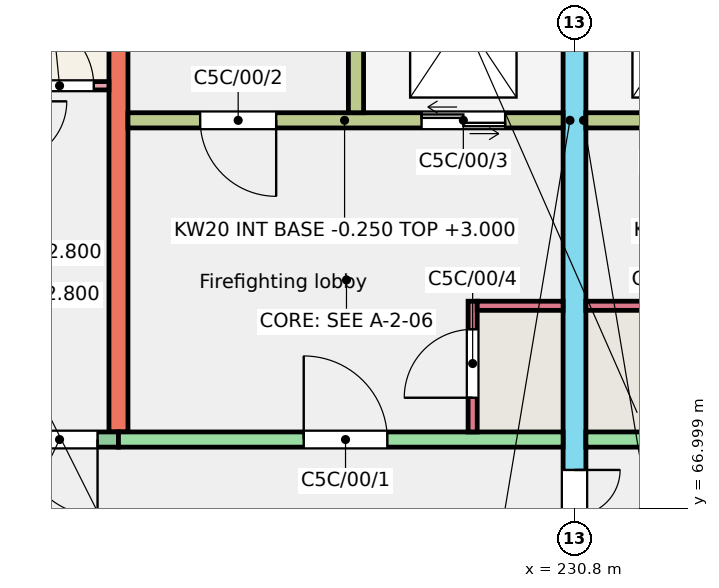
"""IFC4 building model, lengths in metres.
Left out: names, types, materials, properties, quantities, classifications, styles, units other than length and angle.
Written with IfcOpenShell. Run it as: python <this file> out.ifc"""

import sys

from ifc_helpers import new_model, si_unit, direction, frame, frame_2d, origin, place, context, subcontext, project, spatial, rectangle, extrude, element, fill, save


model = new_model("IFC4")
c1 = context("Model", 3, precision=1e-05, world=origin(), true_north=direction((0.0, 1.0)))
c2 = subcontext(c1, "Body", "Model", "MODEL_VIEW")
j1 = project(units=[si_unit("LENGTHUNIT", "METRE"), si_unit("PLANEANGLEUNIT", "RADIAN")], contexts=[c1])
p1 = place(None, origin())
s1 = spatial("IfcSite", under=j1, at=p1, CompositionType="ELEMENT")
p2 = place(p1, origin())
s2 = spatial("IfcBuilding", under=s1, at=p2, CompositionType="ELEMENT")
p3 = place(p2, origin())
s3 = spatial("IfcBuildingStorey", under=s2, at=p3, CompositionType="ELEMENT", Elevation=0.0)
p4 = place(p3, frame((224.8, 68.0, -0.25), z_axis=(0.0, 0.0, 1.0), x_axis=(0.0, 1.0, 0.0)))
e1 = element("IfcWall", 1, at=p4, inside=s3, PredefinedType="SHEAR", context=c2, shape_type="SweptSolid", body=[
    extrude(rectangle(XDim=9.0, YDim=0.25, at=frame_2d((4.5, 0.0))), origin(), (0.0, 0.0, 1.0), 3.25),
])
p5 = place(p3, frame((230.8, 66.0, -0.25), z_axis=(0.0, 0.0, 1.0), x_axis=(0.0, 1.0, 0.0)))
e2 = element("IfcWall", 2, at=p5, inside=s3, PredefinedType="SHEAR", context=c2, shape_type="SweptSolid", body=[
    extrude(rectangle(XDim=11.0, YDim=0.3, at=frame_2d((5.5, 0.0))), origin(), (0.0, 0.0, 1.0), 3.25),
])
p6 = place(p5, frame((0.3, 0.0, 0.25)))
e3 = element("IfcOpeningElement", 3, at=p6, cuts=e2, PredefinedType="OPENING", context=c2, shape_type="SweptSolid", body=[
    extrude(rectangle(XDim=1.2, YDim=2.1, at=frame_2d((0.6, 1.05))), frame((0.0, 0.16, 0.0), z_axis=(0.0, -1.0, 0.0), x_axis=(1.0, 0.0, 0.0)), (0.0, 0.0, 1.0), 0.32),
])
p7 = place(p3, frame((221.2, 67.9, -0.25), z_axis=(0.0, 0.0, 1.0), x_axis=(1.0, 0.0, 0.0)))
e4 = element("IfcWall", 4, at=p7, inside=s3, PredefinedType="SOLIDWALL", context=c2, shape_type="SweptSolid", body=[
    extrude(rectangle(XDim=3.6, YDim=0.2, at=frame_2d((1.8, 0.0))), origin(), (0.0, 0.0, 1.0), 3.25),
])
p8 = place(p7, frame((0.495, 0.0, 1.35)))
e5 = element("IfcOpeningElement", 5, at=p8, cuts=e4, PredefinedType="OPENING", context=c2, shape_type="SweptSolid", body=[
    extrude(rectangle(XDim=1.2, YDim=1.3, at=frame_2d((0.6, 0.65))), frame((0.0, 0.11, 0.0), z_axis=(0.0, -1.0, 0.0), x_axis=(1.0, 0.0, 0.0)), (0.0, 0.0, 1.0), 0.22),
])
p9 = place(p7, frame((2.325, 0.0, 0.25)))
e6 = element("IfcOpeningElement", 6, at=p9, cuts=e4, PredefinedType="OPENING", context=c2, shape_type="SweptSolid", body=[
    extrude(rectangle(XDim=1.0, YDim=2.1, at=frame_2d((0.5, 1.05))), frame((0.0, 0.11, 0.0), z_axis=(0.0, -1.0, 0.0), x_axis=(1.0, 0.0, 0.0)), (0.0, 0.0, 1.0), 0.22),
])
p10 = place(p3, frame((224.8, 67.9, -0.25), z_axis=(0.0, 0.0, 1.0), x_axis=(1.0, 0.0, 0.0)))
e7 = element("IfcWall", 7, at=p10, inside=s3, PredefinedType="SHEAR", context=c2, shape_type="SweptSolid", body=[
    extrude(rectangle(XDim=5.85, YDim=0.2, at=frame_2d((2.925, 0.0))), origin(), (0.0, 0.0, 1.0), 3.25),
])
p11 = place(p10, frame((2.438, 0.0, 0.25)))
e8 = element("IfcOpeningElement", 8, at=p11, cuts=e7, PredefinedType="OPENING", context=c2, shape_type="SweptSolid", body=[
    extrude(rectangle(XDim=1.1, YDim=2.1, at=frame_2d((0.55, 1.05))), frame((0.0, 0.11, 0.0), z_axis=(0.0, -1.0, 0.0), x_axis=(1.0, 0.0, 0.0)), (0.0, 0.0, 1.0), 0.22),
])
p12 = place(p3, frame((224.925, 72.1, -0.25), z_axis=(0.0, 0.0, 1.0), x_axis=(1.0, 0.0, 0.0)))
e9 = element("IfcWall", 9, at=p12, inside=s3, PredefinedType="SHEAR", context=c2, shape_type="SweptSolid", body=[
    extrude(rectangle(XDim=5.725, YDim=0.2, at=frame_2d((2.862, 0.0))), origin(), (0.0, 0.0, 1.0), 3.25),
])
p13 = place(p12, frame((0.95, 0.0, 0.25)))
e10 = element("IfcOpeningElement", 10, at=p13, cuts=e9, PredefinedType="OPENING", context=c2, shape_type="SweptSolid", body=[
    extrude(rectangle(XDim=1.0, YDim=2.1, at=frame_2d((0.5, 1.05))), frame((0.0, 0.11, 0.0), z_axis=(0.0, -1.0, 0.0), x_axis=(1.0, 0.0, 0.0)), (0.0, 0.0, 1.0), 0.22),
])
p14 = place(p12, frame((3.863, 0.0, 0.25)))
e11 = element("IfcOpeningElement", 11, at=p14, cuts=e9, PredefinedType="OPENING", context=c2, shape_type="SweptSolid", body=[
    extrude(rectangle(XDim=1.1, YDim=2.1, at=frame_2d((0.55, 1.05))), frame((0.0, 0.11, 0.0), z_axis=(0.0, -1.0, 0.0), x_axis=(1.0, 0.0, 0.0)), (0.0, 0.0, 1.0), 0.22),
])
p15 = place(p3, frame((227.925, 72.2, -0.25), z_axis=(0.0, 0.0, 1.0), x_axis=(0.0, 1.0, 0.0)))
e12 = element("IfcWall", 12, at=p15, inside=s3, PredefinedType="SHEAR", context=c2, shape_type="SweptSolid", body=[
    extrude(rectangle(XDim=4.8, YDim=0.2, at=frame_2d((2.4, 0.0))), origin(), (0.0, 0.0, 1.0), 3.25),
])
p16 = place(p3, frame((229.46, 68.0, -0.25), z_axis=(0.0, 0.0, 1.0), x_axis=(0.0, 1.0, 0.0)))
e13 = element("IfcWall", 13, at=p16, inside=s3, PredefinedType="SHEAR", context=c2, shape_type="SweptSolid", body=[
    extrude(rectangle(XDim=1.72, YDim=0.12, at=frame_2d((0.86, 0.0))), origin(), (0.0, 0.0, 1.0), 3.25),
])
p17 = place(p16, frame((0.45, 0.0, 0.25)))
e14 = element("IfcOpeningElement", 14, at=p17, cuts=e13, PredefinedType="OPENING", context=c2, shape_type="SweptSolid", body=[
    extrude(rectangle(XDim=0.9, YDim=2.1, at=frame_2d((0.45, 1.05))), frame((0.0, 0.07, 0.0), z_axis=(0.0, -1.0, 0.0), x_axis=(1.0, 0.0, 0.0)), (0.0, 0.0, 1.0), 0.14),
])
p18 = place(p3, frame((229.52, 69.66, -0.25), z_axis=(0.0, 0.0, 1.0), x_axis=(1.0, 0.0, 0.0)))
e15 = element("IfcWall", 15, at=p18, inside=s3, PredefinedType="SHEAR", context=c2, shape_type="SweptSolid", body=[
    extrude(rectangle(XDim=1.13, YDim=0.12, at=frame_2d((0.565, 0.0))), origin(), (0.0, 0.0, 1.0), 3.25),
])
p19 = place(p3, frame((230.95, 67.9, -0.25), z_axis=(0.0, 0.0, 1.0), x_axis=(1.0, 0.0, 0.0)))
e16 = element("IfcWall", 16, at=p19, inside=s3, PredefinedType="SHEAR", context=c2, shape_type="SweptSolid", body=[
    extrude(rectangle(XDim=5.85, YDim=0.2, at=frame_2d((2.925, 0.0))), origin(), (0.0, 0.0, 1.0), 3.25),
])
p20 = place(p19, frame((2.312, 0.0, 0.25)))
e17 = element("IfcOpeningElement", 17, at=p20, cuts=e16, PredefinedType="OPENING", context=c2, shape_type="SweptSolid", body=[
    extrude(rectangle(XDim=1.1, YDim=2.1, at=frame_2d((0.55, 1.05))), frame((0.0, 0.11, 0.0), z_axis=(0.0, -1.0, 0.0), x_axis=(1.0, 0.0, 0.0)), (0.0, 0.0, 1.0), 0.22),
])
p21 = place(p3, frame((230.95, 72.1, -0.25), z_axis=(0.0, 0.0, 1.0), x_axis=(1.0, 0.0, 0.0)))
e18 = element("IfcWall", 18, at=p21, inside=s3, PredefinedType="SHEAR", context=c2, shape_type="SweptSolid", body=[
    extrude(rectangle(XDim=5.725, YDim=0.2, at=frame_2d((2.863, 0.0))), origin(), (0.0, 0.0, 1.0), 3.25),
])
p22 = place(p21, frame((3.775, 0.0, 0.25)))
e19 = element("IfcOpeningElement", 19, at=p22, cuts=e18, PredefinedType="OPENING", context=c2, shape_type="SweptSolid", body=[
    extrude(rectangle(XDim=1.0, YDim=2.1, at=frame_2d((0.5, 1.05))), frame((0.0, 0.11, 0.0), z_axis=(0.0, -1.0, 0.0), x_axis=(1.0, 0.0, 0.0)), (0.0, 0.0, 1.0), 0.22),
])
p23 = place(p21, frame((0.762, 0.0, 0.25)))
e20 = element("IfcOpeningElement", 20, at=p23, cuts=e18, PredefinedType="OPENING", context=c2, shape_type="SweptSolid", body=[
    extrude(rectangle(XDim=1.1, YDim=2.1, at=frame_2d((0.55, 1.05))), frame((0.0, 0.11, 0.0), z_axis=(0.0, -1.0, 0.0), x_axis=(1.0, 0.0, 0.0)), (0.0, 0.0, 1.0), 0.22),
])
p24 = place(p3, frame((230.95, 69.66, -0.25), z_axis=(0.0, 0.0, 1.0), x_axis=(1.0, 0.0, 0.0)))
e21 = element("IfcWall", 21, at=p24, inside=s3, PredefinedType="SHEAR", context=c2, shape_type="SweptSolid", body=[
    extrude(rectangle(XDim=1.13, YDim=0.12, at=frame_2d((0.565, 0.0))), origin(), (0.0, 0.0, 1.0), 3.25),
])
p25 = place(p3, frame((227.825, 72.1, -1.4), z_axis=(0.0, 0.0, 1.0), x_axis=(1.0, 0.0, 0.0)))
e22 = element("IfcWall", 22, at=p25, inside=s3, PredefinedType="SHEAR", context=c2, shape_type="SweptSolid", body=[
    extrude(rectangle(XDim=2.975, YDim=0.2, at=frame_2d((1.488, 0.0))), origin(), (0.0, 0.0, 1.0), 1.15),
])
p26 = place(p3, frame((227.925, 72.2, -1.4), z_axis=(0.0, 0.0, 1.0), x_axis=(0.0, 1.0, 0.0)))
e23 = element("IfcWall", 23, at=p26, inside=s3, PredefinedType="SHEAR", context=c2, shape_type="SweptSolid", body=[
    extrude(rectangle(XDim=3.0, YDim=0.2, at=frame_2d((1.5, 0.0))), origin(), (0.0, 0.0, 1.0), 1.15),
])
p27 = place(p3, frame((230.725, 72.2, -1.4), z_axis=(0.0, 0.0, 1.0), x_axis=(0.0, 1.0, 0.0)))
e24 = element("IfcWall", 24, at=p27, inside=s3, PredefinedType="SHEAR", context=c2, shape_type="SweptSolid", body=[
    extrude(rectangle(XDim=3.0, YDim=0.15, at=frame_2d((1.5, 0.0))), origin(), (0.0, 0.0, 1.0), 1.15),
])
p28 = place(p3, frame((230.8, 72.1, -1.4), z_axis=(0.0, 0.0, 1.0), x_axis=(1.0, 0.0, 0.0)))
e25 = element("IfcWall", 25, at=p28, inside=s3, PredefinedType="SHEAR", context=c2, shape_type="SweptSolid", body=[
    extrude(rectangle(XDim=2.975, YDim=0.2, at=frame_2d((1.487, 0.0))), origin(), (0.0, 0.0, 1.0), 1.15),
])
p29 = place(p3, frame((230.875, 72.2, -1.4), z_axis=(0.0, 0.0, 1.0), x_axis=(0.0, 1.0, 0.0)))
e26 = element("IfcWall", 26, at=p29, inside=s3, PredefinedType="SHEAR", context=c2, shape_type="SweptSolid", body=[
    extrude(rectangle(XDim=3.0, YDim=0.15, at=frame_2d((1.5, 0.0))), origin(), (0.0, 0.0, 1.0), 1.15),
])
p30 = place(p3, frame((221.325, 72.555, 0.0), z_axis=(0.0, 0.0, 1.0), x_axis=(1.0, 0.0, 0.0)))
e27 = element("IfcWall", 27, at=p30, inside=s3, PredefinedType="PARTITIONING", context=c2, shape_type="SweptSolid", body=[
    extrude(rectangle(XDim=3.35, YDim=0.11, at=frame_2d((1.675, 0.0))), origin(), (0.0, 0.0, 1.0), 2.8),
])
p31 = place(p30, frame((2.25, 0.0, 0.0)))
e28 = element("IfcOpeningElement", 28, at=p31, cuts=e27, PredefinedType="OPENING", context=c2, shape_type="SweptSolid", body=[
    extrude(rectangle(XDim=0.9, YDim=2.1, at=frame_2d((0.45, 1.05))), frame((0.0, 0.065, 0.0), z_axis=(0.0, -1.0, 0.0), x_axis=(1.0, 0.0, 0.0)), (0.0, 0.0, 1.0), 0.13),
])
p32 = place(p9, origin())
e29 = element("IfcDoor", 29, at=p32, inside=s3, OperationType="SINGLE_SWING_RIGHT", PredefinedType="DOOR", context=c2, shape_type="SweptSolid", body=[
    extrude(rectangle(XDim=1.0, YDim=2.1, at=frame_2d((0.5, 1.05))), frame((0.0, 0.025, 0.0), z_axis=(0.0, -1.0, 0.0), x_axis=(1.0, 0.0, 0.0)), (0.0, 0.0, 1.0), 0.05),
])
fill(e6, e29)
p33 = place(p31, origin())
e30 = element("IfcDoor", 30, at=p33, inside=s3, OperationType="SINGLE_SWING_LEFT", PredefinedType="DOOR", context=c2, shape_type="SweptSolid", body=[
    extrude(rectangle(XDim=0.9, YDim=2.1, at=frame_2d((0.45, 1.05))), frame((0.0, 0.025, 0.0), z_axis=(0.0, -1.0, 0.0), x_axis=(1.0, 0.0, 0.0)), (0.0, 0.0, 1.0), 0.05),
])
fill(e28, e30)
p34 = place(p11, origin())
e31 = element("IfcDoor", 31, at=p34, inside=s3, OperationType="SINGLE_SWING_LEFT", PredefinedType="DOOR", context=c2, shape_type="SweptSolid", body=[
    extrude(rectangle(XDim=1.1, YDim=2.1, at=frame_2d((0.55, 1.05))), frame((0.0, 0.025, 0.0), z_axis=(0.0, -1.0, 0.0), x_axis=(1.0, 0.0, 0.0)), (0.0, 0.0, 1.0), 0.05),
])
fill(e8, e31)
p35 = place(p13, origin())
e32 = element("IfcDoor", 32, at=p35, inside=s3, OperationType="SINGLE_SWING_RIGHT", PredefinedType="DOOR", context=c2, shape_type="SweptSolid", body=[
    extrude(rectangle(XDim=1.0, YDim=2.1, at=frame_2d((0.5, 1.05))), frame((0.0, 0.025, 0.0), z_axis=(0.0, -1.0, 0.0), x_axis=(1.0, 0.0, 0.0)), (0.0, 0.0, 1.0), 0.05),
])
fill(e10, e32)
p36 = place(p14, origin())
e33 = element("IfcDoor", 33, at=p36, inside=s3, OperationType="DOUBLE_DOOR_SLIDING", PredefinedType="DOOR", context=c2, shape_type="SweptSolid", body=[
    extrude(rectangle(XDim=1.1, YDim=2.1, at=frame_2d((0.55, 1.05))), frame((0.0, 0.025, 0.0), z_axis=(0.0, -1.0, 0.0), x_axis=(1.0, 0.0, 0.0)), (0.0, 0.0, 1.0), 0.05),
])
fill(e11, e33)
p37 = place(p17, origin())
e34 = element("IfcDoor", 34, at=p37, inside=s3, OperationType="SINGLE_SWING_LEFT", PredefinedType="DOOR", context=c2, shape_type="SweptSolid", body=[
    extrude(rectangle(XDim=0.9, YDim=2.1, at=frame_2d((0.45, 1.05))), frame((0.0, 0.025, 0.0), z_axis=(0.0, -1.0, 0.0), x_axis=(1.0, 0.0, 0.0)), (0.0, 0.0, 1.0), 0.05),
])
fill(e14, e34)
p38 = place(p6, origin())
e35 = element("IfcDoor", 35, at=p38, inside=s3, OperationType="DOUBLE_DOOR_SINGLE_SWING", PredefinedType="DOOR", context=c2, shape_type="SweptSolid", body=[
    extrude(rectangle(XDim=1.2, YDim=2.1, at=frame_2d((0.6, 1.05))), frame((0.0, 0.025, 0.0), z_axis=(0.0, -1.0, 0.0), x_axis=(1.0, 0.0, 0.0)), (0.0, 0.0, 1.0), 0.05),
])
fill(e3, e35)
save(model, sys.argv[1])
